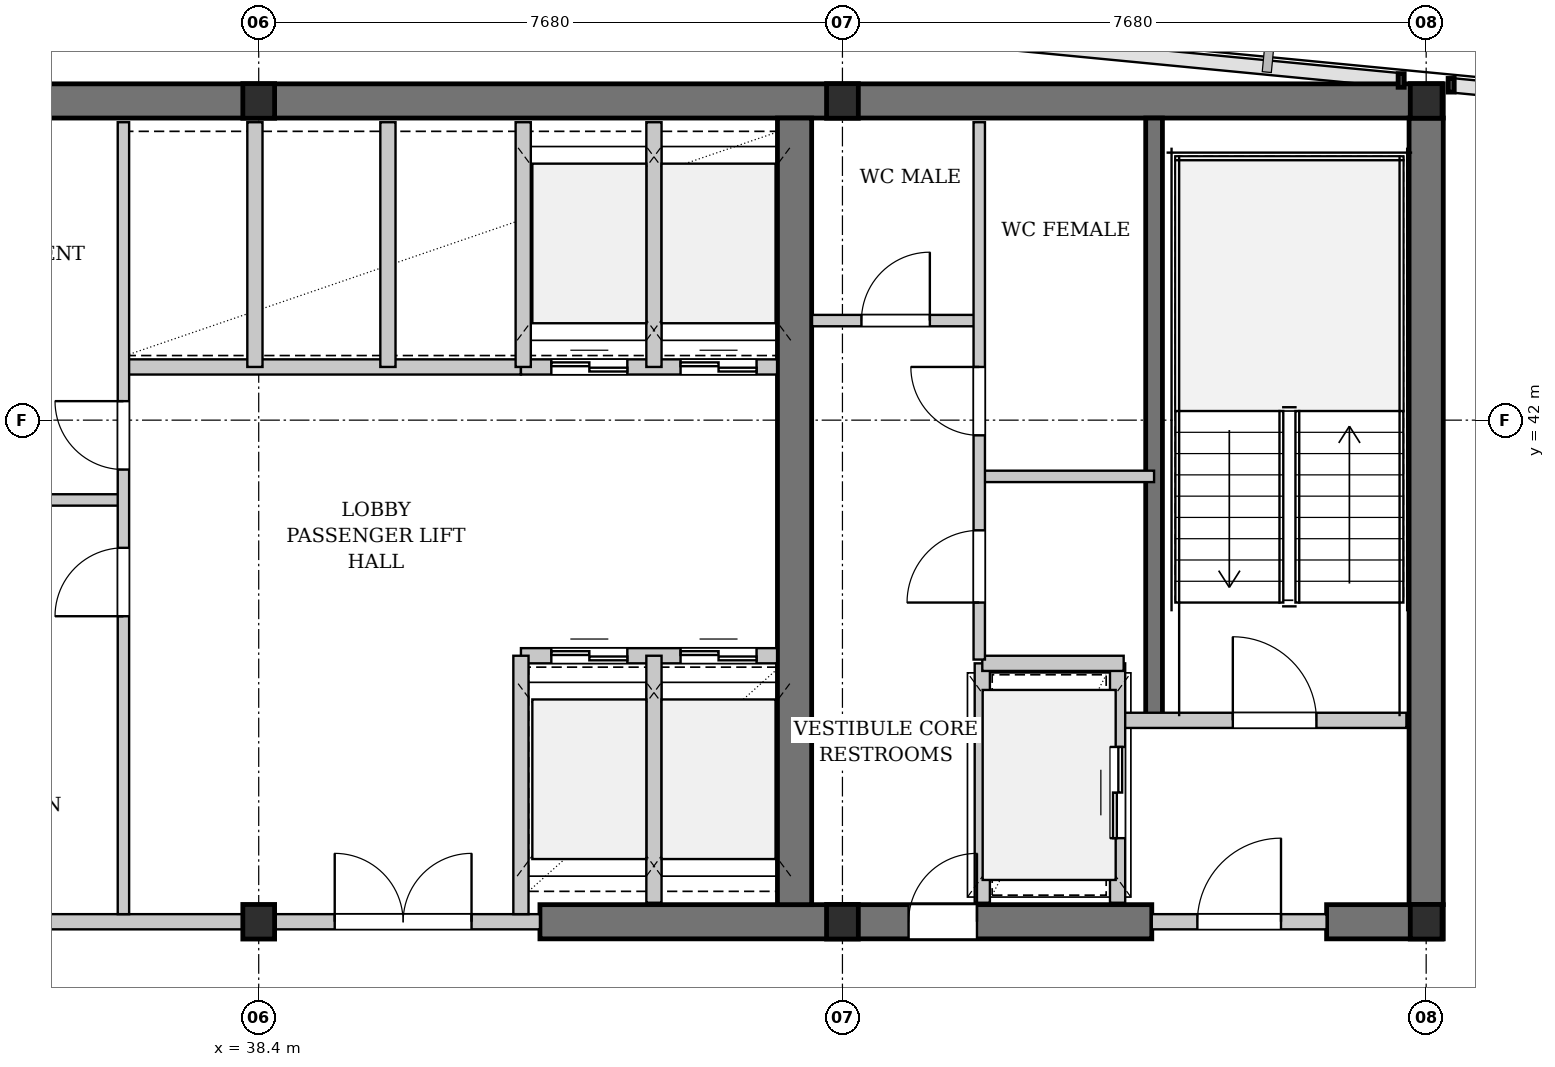
"""IFC4 building model, lengths in metres.
Left out: names, types, materials, properties, quantities, classifications, styles, units other than length and angle.
Written with IfcOpenShell. Run it as: python <this file> out.ifc"""

import sys

from ifc_helpers import new_model, si_unit, direction, frame, frame_2d, origin, origin_2d, place, context, subcontext, project, spatial, rectangle, i_section, extrude, element, fill, save


model = new_model("IFC4")
c1 = context("Model", 3, precision=1e-05, world=origin(), true_north=direction((0.0, 1.0)))
c2 = subcontext(c1, "Body", "Model", "MODEL_VIEW")
j1 = project(units=[si_unit("LENGTHUNIT", "METRE"), si_unit("PLANEANGLEUNIT", "RADIAN")], contexts=[c1])
p1 = place(None, origin())
s1 = spatial("IfcSite", under=j1, at=p1, CompositionType="ELEMENT")
p2 = place(p1, origin())
s2 = spatial("IfcBuilding", under=s1, at=p2, CompositionType="ELEMENT")
p3 = place(p2, frame((0.0, 0.0, 172.1)))
s3 = spatial("IfcBuildingStorey", under=s2, at=p3, CompositionType="ELEMENT", Elevation=172.1)
p4 = place(p3, frame((22.815, 46.2, 0.0), z_axis=(0.0, 0.0, 1.0), x_axis=(1.0, 0.0, 0.0)))
e1 = element("IfcWall", 1, at=p4, inside=s3, PredefinedType="SHEAR", context=c2, shape_type="SweptSolid", body=[
    extrude(rectangle(XDim=31.17, YDim=0.45, at=frame_2d((15.585, 0.0))), origin(), (0.0, 0.0, 1.0), 3.08),
])
p5 = place(p3, frame((42.1, 35.4, 0.0), z_axis=(0.0, 0.0, 1.0), x_axis=(1.0, 0.0, 0.0)))
e2 = element("IfcWall", 2, at=p5, inside=s3, PredefinedType="SHEAR", context=c2, shape_type="SweptSolid", body=[
    extrude(rectangle(XDim=8.05, YDim=0.45, at=frame_2d((4.025, 0.0))), origin(), (0.0, 0.0, 1.0), 3.08),
])
p6 = place(p5, frame((4.85, 0.0, 0.0)))
e3 = element("IfcOpeningElement", 3, at=p6, cuts=e2, PredefinedType="OPENING", context=c2, shape_type="SweptSolid", body=[
    extrude(rectangle(XDim=0.9, YDim=2.15, at=frame_2d((0.45, 1.075))), frame((0.0, 0.235, 0.0), z_axis=(0.0, -1.0, 0.0), x_axis=(1.0, 0.0, 0.0)), (0.0, 0.0, 1.0), 0.47),
])
p7 = place(p3, frame((52.45, 35.4, 0.0), z_axis=(0.0, 0.0, 1.0), x_axis=(1.0, 0.0, 0.0)))
e4 = element("IfcWall", 4, at=p7, inside=s3, PredefinedType="SHEAR", context=c2, shape_type="SweptSolid", body=[
    extrude(rectangle(XDim=1.535, YDim=0.45, at=frame_2d((0.768, 0.0))), origin(), (0.0, 0.0, 1.0), 3.08),
])
for number, where, z_axis, x_axis in (
    (5, (45.45, 35.625, 0.0), (0.0, 0.0, 1.0), (0.0, 1.0, 0.0)),
    (6, (53.76, 35.625, 0.0), (0.0, 0.0, 1.0), (0.0, 1.0, 0.0)),
):
    element("IfcWall", number, at=place(p3, frame(where, z_axis=z_axis, x_axis=x_axis)), inside=s3, PredefinedType="SHEAR", context=c2, shape_type="SweptSolid", body=[
        extrude(rectangle(XDim=10.35, YDim=0.45, at=frame_2d((5.175, 0.0))), origin(), (0.0, 0.0, 1.0), 3.08),
    ])
p8 = place(p3, frame((50.18, 38.05, 0.0), z_axis=(0.0, 0.0, 1.0), x_axis=(0.0, 1.0, 0.0)))
e7 = element("IfcWall", 7, at=p8, inside=s3, PredefinedType="SHEAR", context=c2, shape_type="SweptSolid", body=[
    extrude(rectangle(XDim=7.925, YDim=0.22, at=frame_2d((3.962, 0.0))), origin(), (0.0, 0.0, 1.0), 3.08),
])
for number, where, z_axis, x_axis in (
    (8, (38.4, 35.4, 0.0), (0.0, 0.0, 1.0), (1.0, 0.0, 0.0)),
    (9, (38.4, 46.2, 0.0), (0.0, 0.0, 1.0), (1.0, 0.0, 0.0)),
    (10, (46.08, 35.4, 0.0), (0.0, 0.0, 1.0), (1.0, 0.0, 0.0)),
    (11, (46.08, 46.2, 0.0), (0.0, 0.0, 1.0), (1.0, 0.0, 0.0)),
    (12, (53.76, 35.4, 0.0), (0.0, 0.0, 1.0), (1.0, 0.0, 0.0)),
    (13, (53.76, 46.2, 0.0), (0.0, 0.0, 1.0), (1.0, 0.0, 0.0)),
):
    element("IfcColumn", number, at=place(p3, frame(where, z_axis=z_axis, x_axis=x_axis)), inside=s3, PredefinedType="COLUMN", context=c2, shape_type="SweptSolid", body=[
        extrude(i_section(OverallWidth=0.418, OverallDepth=0.455, WebThickness=0.042, FlangeThickness=0.068, FilletRadius=0.015, at=origin_2d()), origin(), (0.0, 0.0, 1.0), 3.3),
    ])
p9 = place(p3, frame((35.6, 35.4, 0.0), z_axis=(0.0, 0.0, 1.0), x_axis=(1.0, 0.0, 0.0)))
e14 = element("IfcWall", 14, at=p9, inside=s3, PredefinedType="PARTITIONING", context=c2, shape_type="SweptSolid", body=[
    extrude(rectangle(XDim=6.5, YDim=0.2, at=frame_2d((3.25, 0.0))), origin(), (0.0, 0.0, 1.0), 2.475),
])
p10 = place(p9, frame((3.8, 0.0, 0.0)))
e15 = element("IfcOpeningElement", 15, at=p10, cuts=e14, PredefinedType="OPENING", context=c2, shape_type="SweptSolid", body=[
    extrude(rectangle(XDim=1.8, YDim=2.3, at=frame_2d((0.9, 1.15))), frame((0.0, 0.11, 0.0), z_axis=(0.0, -1.0, 0.0), x_axis=(1.0, 0.0, 0.0)), (0.0, 0.0, 1.0), 0.22),
])
p11 = place(p3, frame((36.6, 42.7, 0.0), z_axis=(0.0, 0.0, 1.0), x_axis=(1.0, 0.0, 0.0)))
e16 = element("IfcWall", 16, at=p11, inside=s3, PredefinedType="PARTITIONING", context=c2, shape_type="SweptSolid", body=[
    extrude(rectangle(XDim=5.25, YDim=0.2, at=frame_2d((2.625, 0.0))), origin(), (0.0, 0.0, 1.0), 3.08),
])
p12 = place(p3, frame((38.35, 42.7, 0.0), z_axis=(0.0, 0.0, 1.0), x_axis=(0.0, 1.0, 0.0)))
e17 = element("IfcWall", 17, at=p12, inside=s3, PredefinedType="PARTITIONING", context=c2, shape_type="SweptSolid", body=[
    extrude(rectangle(XDim=3.22, YDim=0.2, at=frame_2d((1.61, 0.0))), origin(), (0.0, 0.0, 1.0), 2.475),
])
p13 = place(p3, frame((40.1, 42.7, 0.0), z_axis=(0.0, 0.0, 1.0), x_axis=(0.0, 1.0, 0.0)))
e18 = element("IfcWall", 18, at=p13, inside=s3, PredefinedType="PARTITIONING", context=c2, shape_type="SweptSolid", body=[
    extrude(rectangle(XDim=3.22, YDim=0.2, at=frame_2d((1.61, 0.0))), origin(), (0.0, 0.0, 1.0), 3.08),
])
p14 = place(p3, frame((33.05, 40.95, 0.0), z_axis=(0.0, 0.0, 1.0), x_axis=(1.0, 0.0, 0.0)))
e19 = element("IfcWall", 19, at=p14, inside=s3, PredefinedType="PARTITIONING", context=c2, shape_type="SweptSolid", body=[
    extrude(rectangle(XDim=3.57, YDim=0.15, at=frame_2d((1.785, 0.0))), origin(), (0.0, 0.0, 1.0), 3.08),
])
p15 = place(p3, frame((36.62, 35.5, 0.0), z_axis=(0.0, 0.0, 1.0), x_axis=(0.0, 1.0, 0.0)))
e20 = element("IfcWall", 20, at=p15, inside=s3, PredefinedType="PARTITIONING", context=c2, shape_type="SweptSolid", body=[
    extrude(rectangle(XDim=10.42, YDim=0.15, at=frame_2d((5.21, 0.0))), origin(), (0.0, 0.0, 1.0), 3.08),
])
p16 = place(p15, frame((3.92, 0.0, 0.0)))
e21 = element("IfcOpeningElement", 21, at=p16, cuts=e20, PredefinedType="OPENING", context=c2, shape_type="SweptSolid", body=[
    extrude(rectangle(XDim=0.9, YDim=2.15, at=frame_2d((0.45, 1.075))), frame((0.0, 0.085, 0.0), z_axis=(0.0, -1.0, 0.0), x_axis=(1.0, 0.0, 0.0)), (0.0, 0.0, 1.0), 0.17),
])
p17 = place(p15, frame((5.85, 0.0, 0.0)))
e22 = element("IfcOpeningElement", 22, at=p17, cuts=e20, PredefinedType="OPENING", context=c2, shape_type="SweptSolid", body=[
    extrude(rectangle(XDim=0.9, YDim=2.15, at=frame_2d((0.45, 1.075))), frame((0.0, 0.085, 0.0), z_axis=(0.0, -1.0, 0.0), x_axis=(1.0, 0.0, 0.0)), (0.0, 0.0, 1.0), 0.17),
])
p18 = place(p3, frame((41.85, 38.9, 0.0), z_axis=(0.0, 0.0, 1.0), x_axis=(1.0, 0.0, 0.0)))
e23 = element("IfcWall", 23, at=p18, inside=s3, PredefinedType="PARTITIONING", context=c2, shape_type="SweptSolid", body=[
    extrude(rectangle(XDim=3.37, YDim=0.2, at=frame_2d((1.685, 0.0))), origin(), (0.0, 0.0, 1.0), 3.08),
])
p19 = place(p18, frame((0.4, 0.0, 0.0)))
e24 = element("IfcOpeningElement", 24, at=p19, cuts=e23, PredefinedType="OPENING", context=c2, shape_type="SweptSolid", body=[
    extrude(rectangle(XDim=1.0, YDim=2.2, at=frame_2d((0.5, 1.1))), frame((0.0, 0.11, 0.0), z_axis=(0.0, -1.0, 0.0), x_axis=(1.0, 0.0, 0.0)), (0.0, 0.0, 1.0), 0.22),
])
p20 = place(p18, frame((2.1, 0.0, 0.0)))
e25 = element("IfcOpeningElement", 25, at=p20, cuts=e23, PredefinedType="OPENING", context=c2, shape_type="SweptSolid", body=[
    extrude(rectangle(XDim=1.0, YDim=2.2, at=frame_2d((0.5, 1.1))), frame((0.0, 0.11, 0.0), z_axis=(0.0, -1.0, 0.0), x_axis=(1.0, 0.0, 0.0)), (0.0, 0.0, 1.0), 0.22),
])
p21 = place(p3, frame((41.85, 42.7, 0.0), z_axis=(0.0, 0.0, 1.0), x_axis=(1.0, 0.0, 0.0)))
e26 = element("IfcWall", 26, at=p21, inside=s3, PredefinedType="PARTITIONING", context=c2, shape_type="SweptSolid", body=[
    extrude(rectangle(XDim=3.37, YDim=0.2, at=frame_2d((1.685, 0.0))), origin(), (0.0, 0.0, 1.0), 3.08),
])
p22 = place(p21, frame((0.4, 0.0, 0.0)))
e27 = element("IfcOpeningElement", 27, at=p22, cuts=e26, PredefinedType="OPENING", context=c2, shape_type="SweptSolid", body=[
    extrude(rectangle(XDim=1.0, YDim=2.2, at=frame_2d((0.5, 1.1))), frame((0.0, 0.11, 0.0), z_axis=(0.0, -1.0, 0.0), x_axis=(1.0, 0.0, 0.0)), (0.0, 0.0, 1.0), 0.22),
])
p23 = place(p21, frame((2.1, 0.0, 0.0)))
e28 = element("IfcOpeningElement", 28, at=p23, cuts=e26, PredefinedType="OPENING", context=c2, shape_type="SweptSolid", body=[
    extrude(rectangle(XDim=1.0, YDim=2.2, at=frame_2d((0.5, 1.1))), frame((0.0, 0.11, 0.0), z_axis=(0.0, -1.0, 0.0), x_axis=(1.0, 0.0, 0.0)), (0.0, 0.0, 1.0), 0.22),
])
p24 = place(p3, frame((43.6, 35.65, 0.0), z_axis=(0.0, 0.0, 1.0), x_axis=(0.0, 1.0, 0.0)))
e29 = element("IfcWall", 29, at=p24, inside=s3, PredefinedType="PARTITIONING", context=c2, shape_type="SweptSolid", body=[
    extrude(rectangle(XDim=3.25, YDim=0.2, at=frame_2d((1.625, 0.0))), origin(), (0.0, 0.0, 1.0), 3.08),
])
p25 = place(p3, frame((43.6, 42.7, 0.0), z_axis=(0.0, 0.0, 1.0), x_axis=(0.0, 1.0, 0.0)))
e30 = element("IfcWall", 30, at=p25, inside=s3, PredefinedType="PARTITIONING", context=c2, shape_type="SweptSolid", body=[
    extrude(rectangle(XDim=3.22, YDim=0.2, at=frame_2d((1.61, 0.0))), origin(), (0.0, 0.0, 1.0), 3.08),
])
p26 = place(p3, frame((41.85, 35.5, 0.0), z_axis=(0.0, 0.0, 1.0), x_axis=(0.0, 1.0, 0.0)))
e31 = element("IfcWall", 31, at=p26, inside=s3, PredefinedType="PARTITIONING", context=c2, shape_type="SweptSolid", body=[
    extrude(rectangle(XDim=3.4, YDim=0.2, at=frame_2d((1.7, 0.0))), origin(), (0.0, 0.0, 1.0), 3.08),
])
p27 = place(p3, frame((41.88, 42.7, 0.0), z_axis=(0.0, 0.0, 1.0), x_axis=(0.0, 1.0, 0.0)))
e32 = element("IfcWall", 32, at=p27, inside=s3, PredefinedType="PARTITIONING", context=c2, shape_type="SweptSolid", body=[
    extrude(rectangle(XDim=3.22, YDim=0.2, at=frame_2d((1.61, 0.0))), origin(), (0.0, 0.0, 1.0), 3.08),
])
p28 = place(p3, frame((49.78, 38.05, 0.0), z_axis=(0.0, 0.0, 1.0), x_axis=(1.0, 0.0, 0.0)))
e33 = element("IfcWall", 33, at=p28, inside=s3, PredefinedType="PARTITIONING", context=c2, shape_type="SweptSolid", body=[
    extrude(rectangle(XDim=3.72, YDim=0.2, at=frame_2d((1.86, 0.0))), origin(), (0.0, 0.0, 1.0), 3.08),
])
p29 = place(p28, frame((1.436, 0.0, 0.0)))
e34 = element("IfcOpeningElement", 34, at=p29, cuts=e33, PredefinedType="OPENING", context=c2, shape_type="SweptSolid", body=[
    extrude(rectangle(XDim=1.1, YDim=2.15, at=frame_2d((0.55, 1.075))), frame((0.0, 0.11, 0.0), z_axis=(0.0, -1.0, 0.0), x_axis=(1.0, 0.0, 0.0)), (0.0, 0.0, 1.0), 0.22),
])
p30 = place(p3, frame((50.15, 35.4, 0.0), z_axis=(0.0, 0.0, 1.0), x_axis=(1.0, 0.0, 0.0)))
e35 = element("IfcWall", 35, at=p30, inside=s3, PredefinedType="PARTITIONING", context=c2, shape_type="SweptSolid", body=[
    extrude(rectangle(XDim=2.3, YDim=0.2, at=frame_2d((1.15, 0.0))), origin(), (0.0, 0.0, 1.0), 2.475),
])
p31 = place(p30, frame((0.6, 0.0, 0.0)))
e36 = element("IfcOpeningElement", 36, at=p31, cuts=e35, PredefinedType="OPENING", context=c2, shape_type="SweptSolid", body=[
    extrude(rectangle(XDim=1.1, YDim=2.15, at=frame_2d((0.55, 1.075))), frame((0.0, 0.11, 0.0), z_axis=(0.0, -1.0, 0.0), x_axis=(1.0, 0.0, 0.0)), (0.0, 0.0, 1.0), 0.22),
])
p32 = place(p3, frame((49.7, 35.65, 0.0), z_axis=(0.0, 0.0, 1.0), x_axis=(0.0, 1.0, 0.0)))
e37 = element("IfcWall", 37, at=p32, inside=s3, PredefinedType="PARTITIONING", context=c2, shape_type="SweptSolid", body=[
    extrude(rectangle(XDim=3.15, YDim=0.2, at=frame_2d((1.575, 0.0))), origin(), (0.0, 0.0, 1.0), 3.08),
])
p33 = place(p32, frame((0.85, 0.0, 0.0)))
e38 = element("IfcOpeningElement", 38, at=p33, cuts=e37, PredefinedType="OPENING", context=c2, shape_type="SweptSolid", body=[
    extrude(rectangle(XDim=1.2, YDim=2.2, at=frame_2d((0.6, 1.1))), frame((0.0, 0.11, 0.0), z_axis=(0.0, -1.0, 0.0), x_axis=(1.0, 0.0, 0.0)), (0.0, 0.0, 1.0), 0.22),
])
p34 = place(p3, frame((47.92, 35.65, 0.0), z_axis=(0.0, 0.0, 1.0), x_axis=(0.0, 1.0, 0.0)))
e39 = element("IfcWall", 39, at=p34, inside=s3, PredefinedType="PARTITIONING", context=c2, shape_type="SweptSolid", body=[
    extrude(rectangle(XDim=3.15, YDim=0.2, at=frame_2d((1.575, 0.0))), origin(), (0.0, 0.0, 1.0), 3.08),
])
p35 = place(p3, frame((47.92, 38.8, 0.0), z_axis=(0.0, 0.0, 1.0), x_axis=(1.0, 0.0, 0.0)))
e40 = element("IfcWall", 40, at=p35, inside=s3, PredefinedType="PARTITIONING", context=c2, shape_type="SweptSolid", body=[
    extrude(rectangle(XDim=1.86, YDim=0.2, at=frame_2d((0.93, 0.0))), origin(), (0.0, 0.0, 1.0), 3.08),
])
p36 = place(p3, frame((45.68, 43.31, 0.0), z_axis=(0.0, 0.0, 1.0), x_axis=(1.0, 0.0, 0.0)))
e41 = element("IfcWall", 41, at=p36, inside=s3, PredefinedType="PARTITIONING", context=c2, shape_type="SweptSolid", body=[
    extrude(rectangle(XDim=2.2, YDim=0.15, at=frame_2d((1.1, 0.0))), origin(), (0.0, 0.0, 1.0), 3.08),
])
p37 = place(p36, frame((0.65, 0.0, 0.0)))
e42 = element("IfcOpeningElement", 42, at=p37, cuts=e41, PredefinedType="OPENING", context=c2, shape_type="SweptSolid", body=[
    extrude(rectangle(XDim=0.9, YDim=2.15, at=frame_2d((0.45, 1.075))), frame((0.0, 0.085, 0.0), z_axis=(0.0, -1.0, 0.0), x_axis=(1.0, 0.0, 0.0)), (0.0, 0.0, 1.0), 0.17),
])
p38 = place(p3, frame((47.88, 41.26, 0.0), z_axis=(0.0, 0.0, 1.0), x_axis=(1.0, 0.0, 0.0)))
e43 = element("IfcWall", 43, at=p38, inside=s3, PredefinedType="PARTITIONING", context=c2, shape_type="SweptSolid", body=[
    extrude(rectangle(XDim=2.3, YDim=0.15, at=frame_2d((1.15, 0.0))), origin(), (0.0, 0.0, 1.0), 3.08),
])
p39 = place(p3, frame((47.88, 38.85, 0.0), z_axis=(0.0, 0.0, 1.0), x_axis=(0.0, 1.0, 0.0)))
e44 = element("IfcWall", 44, at=p39, inside=s3, PredefinedType="PARTITIONING", context=c2, shape_type="SweptSolid", body=[
    extrude(rectangle(XDim=7.07, YDim=0.15, at=frame_2d((3.535, 0.0))), origin(), (0.0, 0.0, 1.0), 3.08),
])
p40 = place(p39, frame((0.75, 0.0, 0.0)))
e45 = element("IfcOpeningElement", 45, at=p40, cuts=e44, PredefinedType="OPENING", context=c2, shape_type="SweptSolid", body=[
    extrude(rectangle(XDim=0.95, YDim=2.15, at=frame_2d((0.475, 1.075))), frame((0.0, 0.085, 0.0), z_axis=(0.0, -1.0, 0.0), x_axis=(1.0, 0.0, 0.0)), (0.0, 0.0, 1.0), 0.17),
])
p41 = place(p39, frame((2.95, 0.0, 0.0)))
e46 = element("IfcOpeningElement", 46, at=p41, cuts=e44, PredefinedType="OPENING", context=c2, shape_type="SweptSolid", body=[
    extrude(rectangle(XDim=0.9, YDim=2.15, at=frame_2d((0.45, 1.075))), frame((0.0, 0.085, 0.0), z_axis=(0.0, -1.0, 0.0), x_axis=(1.0, 0.0, 0.0)), (0.0, 0.0, 1.0), 0.17),
])
p42 = place(p10, origin())
e47 = element("IfcDoor", 47, at=p42, inside=s3, OperationType="DOUBLE_DOOR_SINGLE_SWING", PredefinedType="DOOR", context=c2, shape_type="SweptSolid", body=[
    extrude(rectangle(XDim=1.8, YDim=2.3, at=frame_2d((0.9, 1.15))), frame((0.0, 0.025, 0.0), z_axis=(0.0, -1.0, 0.0), x_axis=(1.0, 0.0, 0.0)), (0.0, 0.0, 1.0), 0.05),
])
fill(e15, e47)
p43 = place(p16, origin())
e48 = element("IfcDoor", 48, at=p43, inside=s3, OperationType="SINGLE_SWING_LEFT", PredefinedType="DOOR", context=c2, shape_type="SweptSolid", body=[
    extrude(rectangle(XDim=0.9, YDim=2.15, at=frame_2d((0.45, 1.075))), frame((0.0, 0.025, 0.0), z_axis=(0.0, -1.0, 0.0), x_axis=(1.0, 0.0, 0.0)), (0.0, 0.0, 1.0), 0.05),
])
fill(e21, e48)
p44 = place(p17, origin())
e49 = element("IfcDoor", 49, at=p44, inside=s3, OperationType="SINGLE_SWING_RIGHT", PredefinedType="DOOR", context=c2, shape_type="SweptSolid", body=[
    extrude(rectangle(XDim=0.9, YDim=2.15, at=frame_2d((0.45, 1.075))), frame((0.0, 0.025, 0.0), z_axis=(0.0, -1.0, 0.0), x_axis=(1.0, 0.0, 0.0)), (0.0, 0.0, 1.0), 0.05),
])
fill(e22, e49)
p45 = place(p19, origin())
e50 = element("IfcDoor", 50, at=p45, inside=s3, OperationType="DOUBLE_DOOR_SLIDING", PredefinedType="DOOR", context=c2, shape_type="SweptSolid", body=[
    extrude(rectangle(XDim=1.0, YDim=2.2, at=frame_2d((0.5, 1.1))), frame((0.0, 0.025, 0.0), z_axis=(0.0, -1.0, 0.0), x_axis=(1.0, 0.0, 0.0)), (0.0, 0.0, 1.0), 0.05),
])
fill(e24, e50)
p46 = place(p20, origin())
e51 = element("IfcDoor", 51, at=p46, inside=s3, OperationType="DOUBLE_DOOR_SLIDING", PredefinedType="DOOR", context=c2, shape_type="SweptSolid", body=[
    extrude(rectangle(XDim=1.0, YDim=2.2, at=frame_2d((0.5, 1.1))), frame((0.0, 0.025, 0.0), z_axis=(0.0, -1.0, 0.0), x_axis=(1.0, 0.0, 0.0)), (0.0, 0.0, 1.0), 0.05),
])
fill(e25, e51)
p47 = place(p22, origin())
e52 = element("IfcDoor", 52, at=p47, inside=s3, OperationType="DOUBLE_DOOR_SLIDING", PredefinedType="DOOR", context=c2, shape_type="SweptSolid", body=[
    extrude(rectangle(XDim=1.0, YDim=2.2, at=frame_2d((0.5, 1.1))), frame((0.0, 0.025, 0.0), z_axis=(0.0, -1.0, 0.0), x_axis=(1.0, 0.0, 0.0)), (0.0, 0.0, 1.0), 0.05),
])
fill(e27, e52)
p48 = place(p23, origin())
e53 = element("IfcDoor", 53, at=p48, inside=s3, OperationType="DOUBLE_DOOR_SLIDING", PredefinedType="DOOR", context=c2, shape_type="SweptSolid", body=[
    extrude(rectangle(XDim=1.0, YDim=2.2, at=frame_2d((0.5, 1.1))), frame((0.0, 0.025, 0.0), z_axis=(0.0, -1.0, 0.0), x_axis=(1.0, 0.0, 0.0)), (0.0, 0.0, 1.0), 0.05),
])
fill(e28, e53)
p49 = place(p29, origin())
e54 = element("IfcDoor", 54, at=p49, inside=s3, OperationType="SINGLE_SWING_LEFT", PredefinedType="DOOR", context=c2, shape_type="SweptSolid", body=[
    extrude(rectangle(XDim=1.1, YDim=2.15, at=frame_2d((0.55, 1.075))), frame((0.0, 0.025, 0.0), z_axis=(0.0, -1.0, 0.0), x_axis=(1.0, 0.0, 0.0)), (0.0, 0.0, 1.0), 0.05),
])
fill(e34, e54)
p50 = place(p31, origin())
e55 = element("IfcDoor", 55, at=p50, inside=s3, OperationType="SINGLE_SWING_RIGHT", PredefinedType="DOOR", context=c2, shape_type="SweptSolid", body=[
    extrude(rectangle(XDim=1.1, YDim=2.15, at=frame_2d((0.55, 1.075))), frame((0.0, 0.025, 0.0), z_axis=(0.0, -1.0, 0.0), x_axis=(1.0, 0.0, 0.0)), (0.0, 0.0, 1.0), 0.05),
])
fill(e36, e55)
p51 = place(p33, origin())
e56 = element("IfcDoor", 56, at=p51, inside=s3, OperationType="DOUBLE_DOOR_SLIDING", PredefinedType="DOOR", context=c2, shape_type="SweptSolid", body=[
    extrude(rectangle(XDim=1.2, YDim=2.2, at=frame_2d((0.6, 1.1))), frame((0.0, 0.025, 0.0), z_axis=(0.0, -1.0, 0.0), x_axis=(1.0, 0.0, 0.0)), (0.0, 0.0, 1.0), 0.05),
])
fill(e38, e56)
p52 = place(p37, origin())
e57 = element("IfcDoor", 57, at=p52, inside=s3, OperationType="SINGLE_SWING_RIGHT", PredefinedType="DOOR", context=c2, shape_type="SweptSolid", body=[
    extrude(rectangle(XDim=0.9, YDim=2.15, at=frame_2d((0.45, 1.075))), frame((0.0, 0.025, 0.0), z_axis=(0.0, -1.0, 0.0), x_axis=(1.0, 0.0, 0.0)), (0.0, 0.0, 1.0), 0.05),
])
fill(e42, e57)
p53 = place(p40, origin())
e58 = element("IfcDoor", 58, at=p53, inside=s3, OperationType="SINGLE_SWING_LEFT", PredefinedType="DOOR", context=c2, shape_type="SweptSolid", body=[
    extrude(rectangle(XDim=0.95, YDim=2.15, at=frame_2d((0.475, 1.075))), frame((0.0, 0.025, 0.0), z_axis=(0.0, -1.0, 0.0), x_axis=(1.0, 0.0, 0.0)), (0.0, 0.0, 1.0), 0.05),
])
fill(e45, e58)
p54 = place(p41, origin())
e59 = element("IfcDoor", 59, at=p54, inside=s3, OperationType="SINGLE_SWING_RIGHT", PredefinedType="DOOR", context=c2, shape_type="SweptSolid", body=[
    extrude(rectangle(XDim=0.9, YDim=2.15, at=frame_2d((0.45, 1.075))), frame((0.0, 0.025, 0.0), z_axis=(0.0, -1.0, 0.0), x_axis=(1.0, 0.0, 0.0)), (0.0, 0.0, 1.0), 0.05),
])
fill(e46, e59)
p55 = place(p6, origin())
e60 = element("IfcDoor", 60, at=p55, inside=s3, OperationType="SINGLE_SWING_RIGHT", PredefinedType="DOOR", context=c2, shape_type="SweptSolid", body=[
    extrude(rectangle(XDim=0.9, YDim=2.15, at=frame_2d((0.45, 1.075))), frame((0.0, 0.025, 0.0), z_axis=(0.0, -1.0, 0.0), x_axis=(1.0, 0.0, 0.0)), (0.0, 0.0, 1.0), 0.05),
])
fill(e3, e60)
save(model, sys.argv[1])
